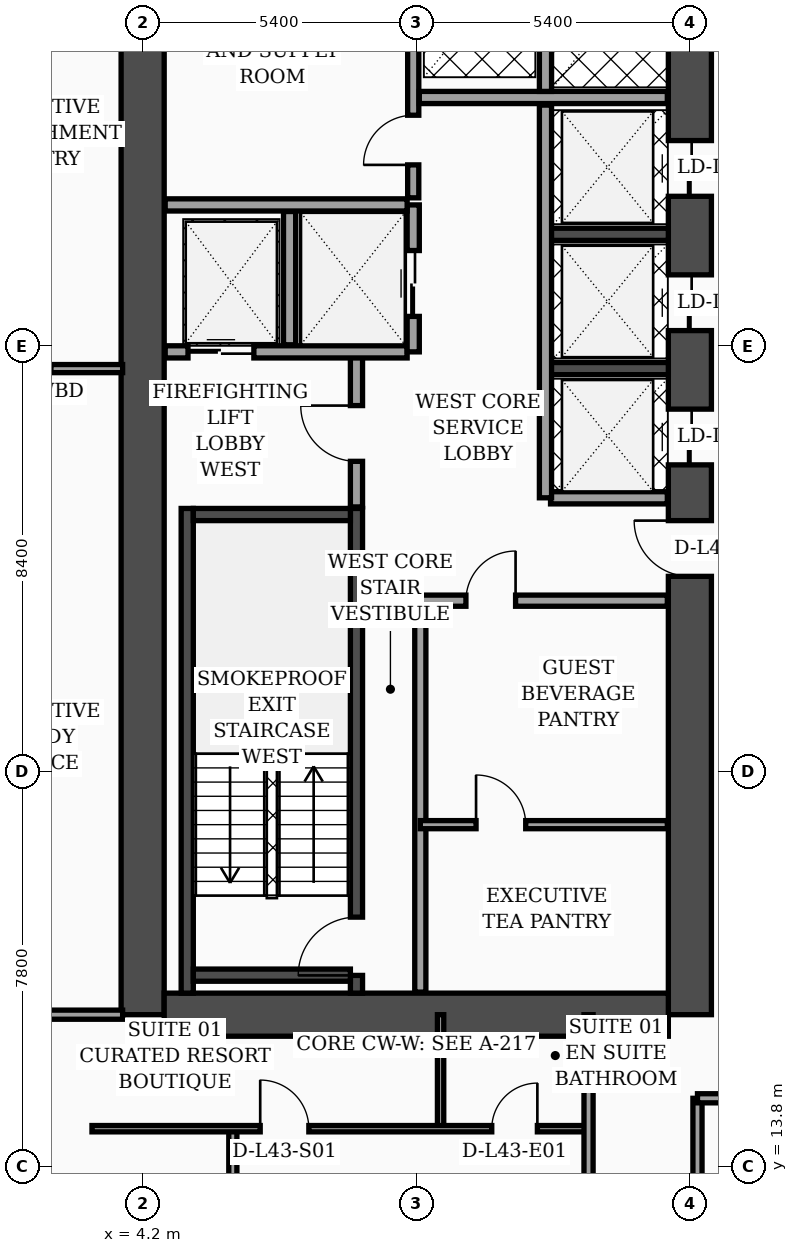
"""IFC4 building model, lengths in metres.
Left out: names, types, materials, properties, quantities, classifications, styles, units other than length and angle.
Written with IfcOpenShell. Run it as: python <this file> out.ifc"""

import sys

from ifc_helpers import new_model, si_unit, direction, frame, frame_2d, origin, place, context, subcontext, project, spatial, rectangle, extrude, element, fill, save


model = new_model("IFC4")
c1 = context("Model", 3, precision=1e-05, world=origin(), true_north=direction((0.0, 1.0)))
c2 = subcontext(c1, "Body", "Model", "MODEL_VIEW")
j1 = project(units=[si_unit("LENGTHUNIT", "METRE"), si_unit("PLANEANGLEUNIT", "RADIAN")], contexts=[c1])
p1 = place(None, origin())
s1 = spatial("IfcSite", under=j1, at=p1, CompositionType="ELEMENT")
p2 = place(p1, origin())
s2 = spatial("IfcBuilding", under=s1, at=p2, CompositionType="ELEMENT")
p3 = place(p2, frame((0.0, 0.0, 175.1)))
s3 = spatial("IfcBuildingStorey", under=s2, at=p3, CompositionType="ELEMENT", Elevation=175.1)
p4 = place(p3, frame((4.2, 16.8, 0.0), z_axis=(0.0, 0.0, 1.0), x_axis=(0.0, 1.0, 0.0)))
e1 = element("IfcWall", 1, at=p4, inside=s3, PredefinedType="SHEAR", context=c2, shape_type="SweptSolid", body=[
    extrude(rectangle(XDim=21.6, YDim=0.85, at=frame_2d((10.8, 0.0))), origin(), (0.0, 0.0, 1.0), 3.56),
])
p5 = place(p3, frame((15.0, 16.8, 0.0), z_axis=(0.0, 0.0, 1.0), x_axis=(0.0, 1.0, 0.0)))
e2 = element("IfcWall", 2, at=p5, inside=s3, PredefinedType="SHEAR", context=c2, shape_type="SweptSolid", body=[
    extrude(rectangle(XDim=21.6, YDim=0.85, at=frame_2d((10.8, 0.0))), origin(), (0.0, 0.0, 1.0), 3.56),
])
p6 = place(p5, frame((8.65, 0.0, 0.0)))
e3 = element("IfcOpeningElement", 3, at=p6, cuts=e2, PredefinedType="OPENING", context=c2, shape_type="SweptSolid", body=[
    extrude(rectangle(XDim=1.1, YDim=2.2, at=frame_2d((0.55, 1.1))), frame((0.0, 0.435, 0.0), z_axis=(0.0, -1.0, 0.0), x_axis=(1.0, 0.0, 0.0)), (0.0, 0.0, 1.0), 0.87),
])
p7 = place(p5, frame((10.85, 0.0, 0.0)))
e4 = element("IfcOpeningElement", 4, at=p7, cuts=e2, PredefinedType="OPENING", context=c2, shape_type="SweptSolid", body=[
    extrude(rectangle(XDim=1.1, YDim=2.2, at=frame_2d((0.55, 1.1))), frame((0.0, 0.435, 0.0), z_axis=(0.0, -1.0, 0.0), x_axis=(1.0, 0.0, 0.0)), (0.0, 0.0, 1.0), 0.87),
])
p8 = place(p5, frame((13.5, 0.0, 0.0)))
e5 = element("IfcOpeningElement", 5, at=p8, cuts=e2, PredefinedType="OPENING", context=c2, shape_type="SweptSolid", body=[
    extrude(rectangle(XDim=1.1, YDim=2.2, at=frame_2d((0.55, 1.1))), frame((0.0, 0.435, 0.0), z_axis=(0.0, -1.0, 0.0), x_axis=(1.0, 0.0, 0.0)), (0.0, 0.0, 1.0), 0.87),
])
p9 = place(p5, frame((16.15, 0.0, 0.0)))
e6 = element("IfcOpeningElement", 6, at=p9, cuts=e2, PredefinedType="OPENING", context=c2, shape_type="SweptSolid", body=[
    extrude(rectangle(XDim=1.1, YDim=2.2, at=frame_2d((0.55, 1.1))), frame((0.0, 0.435, 0.0), z_axis=(0.0, -1.0, 0.0), x_axis=(1.0, 0.0, 0.0)), (0.0, 0.0, 1.0), 0.87),
])
p10 = place(p3, frame((4.625, 16.8, 0.0), z_axis=(0.0, 0.0, 1.0), x_axis=(1.0, 0.0, 0.0)))
e7 = element("IfcWall", 7, at=p10, inside=s3, PredefinedType="SHEAR", context=c2, shape_type="SweptSolid", body=[
    extrude(rectangle(XDim=9.95, YDim=0.85, at=frame_2d((4.975, 0.0))), origin(), (0.0, 0.0, 1.0), 3.56),
])
p11 = place(p3, frame((5.08, 17.225, 0.0), z_axis=(0.0, 0.0, 1.0), x_axis=(0.0, 1.0, 0.0)))
e8 = element("IfcWall", 8, at=p11, inside=s3, PredefinedType="SOLIDWALL", context=c2, shape_type="SweptSolid", body=[
    extrude(rectangle(XDim=9.565, YDim=0.24, at=frame_2d((4.782, 0.0))), origin(), (0.0, 0.0, 1.0), 3.56),
])
p12 = place(p3, frame((8.42, 17.225, 0.0), z_axis=(0.0, 0.0, 1.0), x_axis=(0.0, 1.0, 0.0)))
e9 = element("IfcWall", 9, at=p12, inside=s3, PredefinedType="SOLIDWALL", context=c2, shape_type="SweptSolid", body=[
    extrude(rectangle(XDim=9.565, YDim=0.24, at=frame_2d((4.782, 0.0))), origin(), (0.0, 0.0, 1.0), 3.56),
])
p13 = place(p12, frame((0.35, 0.0, 0.0)))
e10 = element("IfcOpeningElement", 10, at=p13, cuts=e9, PredefinedType="OPENING", context=c2, shape_type="SweptSolid", body=[
    extrude(rectangle(XDim=1.15, YDim=2.2, at=frame_2d((0.575, 1.1))), frame((0.0, 0.13, 0.0), z_axis=(0.0, -1.0, 0.0), x_axis=(1.0, 0.0, 0.0)), (0.0, 0.0, 1.0), 0.26),
])
for number, where, z_axis, x_axis in (
    (11, (5.2, 17.58, 0.0), (0.0, 0.0, 1.0), (1.0, 0.0, 0.0)),
    (12, (5.2, 26.67, 0.0), (0.0, 0.0, 1.0), (1.0, 0.0, 0.0)),
):
    element("IfcWall", number, at=place(p3, frame(where, z_axis=z_axis, x_axis=x_axis)), inside=s3, PredefinedType="SOLIDWALL", context=c2, shape_type="SweptSolid", body=[
        extrude(rectangle(XDim=3.1, YDim=0.24, at=frame_2d((1.55, 0.0))), origin(), (0.0, 0.0, 1.0), 3.56),
    ])
for number, where, z_axis, x_axis in (
    (13, (12.18, 29.55, 0.0), (0.0, 0.0, 1.0), (1.0, 0.0, 0.0)),
    (14, (12.18, 32.2, 0.0), (0.0, 0.0, 1.0), (1.0, 0.0, 0.0)),
):
    element("IfcWall", number, at=place(p3, frame(where, z_axis=z_axis, x_axis=x_axis)), inside=s3, PredefinedType="SOLIDWALL", context=c2, shape_type="SweptSolid", body=[
        extrude(rectangle(XDim=2.395, YDim=0.24, at=frame_2d((1.198, 0.0))), origin(), (0.0, 0.0, 1.0), 3.56),
    ])
p14 = place(p3, frame((8.42, 26.82, 0.0), z_axis=(0.0, 0.0, 1.0), x_axis=(0.0, 1.0, 0.0)))
e15 = element("IfcWall", 15, at=p14, inside=s3, PredefinedType="SOLIDWALL", context=c2, shape_type="SweptSolid", body=[
    extrude(rectangle(XDim=3.0, YDim=0.24, at=frame_2d((1.5, 0.0))), origin(), (0.0, 0.0, 1.0), 3.56),
])
p15 = place(p14, frame((0.9, 0.0, 0.0)))
e16 = element("IfcOpeningElement", 16, at=p15, cuts=e15, PredefinedType="OPENING", context=c2, shape_type="SweptSolid", body=[
    extrude(rectangle(XDim=1.1, YDim=2.2, at=frame_2d((0.55, 1.1))), frame((0.0, 0.13, 0.0), z_axis=(0.0, -1.0, 0.0), x_axis=(1.0, 0.0, 0.0)), (0.0, 0.0, 1.0), 0.26),
])
p16 = place(p3, frame((4.645, 29.88, 0.0), z_axis=(0.0, 0.0, 1.0), x_axis=(1.0, 0.0, 0.0)))
e17 = element("IfcWall", 17, at=p16, inside=s3, PredefinedType="SOLIDWALL", context=c2, shape_type="SweptSolid", body=[
    extrude(rectangle(XDim=4.775, YDim=0.24, at=frame_2d((2.387, 0.0))), origin(), (0.0, 0.0, 1.0), 3.56),
])
p17 = place(p16, frame((0.45, 0.0, 0.0)))
e18 = element("IfcOpeningElement", 18, at=p17, cuts=e17, PredefinedType="OPENING", context=c2, shape_type="SweptSolid", body=[
    extrude(rectangle(XDim=1.3, YDim=2.35, at=frame_2d((0.65, 1.175))), frame((0.0, 0.13, 0.0), z_axis=(0.0, -1.0, 0.0), x_axis=(1.0, 0.0, 0.0)), (0.0, 0.0, 1.0), 0.26),
])
p18 = place(p3, frame((7.1, 30.02, 0.0), z_axis=(0.0, 0.0, 1.0), x_axis=(0.0, 1.0, 0.0)))
e19 = element("IfcWall", 19, at=p18, inside=s3, PredefinedType="SOLIDWALL", context=c2, shape_type="SweptSolid", body=[
    extrude(rectangle(XDim=2.63, YDim=0.24, at=frame_2d((1.315, 0.0))), origin(), (0.0, 0.0, 1.0), 3.56),
])
p19 = place(p3, frame((9.54, 29.88, 0.0), z_axis=(0.0, 0.0, 1.0), x_axis=(0.0, 1.0, 0.0)))
e20 = element("IfcWall", 20, at=p19, inside=s3, PredefinedType="SOLIDWALL", context=c2, shape_type="SweptSolid", body=[
    extrude(rectangle(XDim=2.9, YDim=0.24, at=frame_2d((1.45, 0.0))), origin(), (0.0, 0.0, 1.0), 3.56),
])
p20 = place(p19, frame((0.7, 0.0, 0.0)))
e21 = element("IfcOpeningElement", 21, at=p20, cuts=e20, PredefinedType="OPENING", context=c2, shape_type="SweptSolid", body=[
    extrude(rectangle(XDim=1.3, YDim=2.35, at=frame_2d((0.65, 1.175))), frame((0.0, 0.13, 0.0), z_axis=(0.0, -1.0, 0.0), x_axis=(1.0, 0.0, 0.0)), (0.0, 0.0, 1.0), 0.26),
])
p21 = place(p3, frame((4.645, 32.78, 0.0), z_axis=(0.0, 0.0, 1.0), x_axis=(1.0, 0.0, 0.0)))
e22 = element("IfcWall", 22, at=p21, inside=s3, PredefinedType="SOLIDWALL", context=c2, shape_type="SweptSolid", body=[
    extrude(rectangle(XDim=4.775, YDim=0.24, at=frame_2d((2.387, 0.0))), origin(), (0.0, 0.0, 1.0), 3.19),
])
p22 = place(p3, frame((9.68, 17.245, 0.0), z_axis=(0.0, 0.0, 1.0), x_axis=(0.0, 1.0, 0.0)))
e23 = element("IfcWall", 23, at=p22, inside=s3, PredefinedType="SOLIDWALL", context=c2, shape_type="SweptSolid", body=[
    extrude(rectangle(XDim=7.755, YDim=0.22, at=frame_2d((3.877, 0.0))), origin(), (0.0, 0.0, 1.0), 3.56),
])
p23 = place(p3, frame((9.54, 32.92, 0.0), z_axis=(0.0, 0.0, 1.0), x_axis=(0.0, 1.0, 0.0)))
e24 = element("IfcWall", 24, at=p23, inside=s3, PredefinedType="SOLIDWALL", context=c2, shape_type="SweptSolid", body=[
    extrude(rectangle(XDim=5.035, YDim=0.22, at=frame_2d((2.518, 0.0))), origin(), (0.0, 0.0, 1.0), 3.56),
])
p24 = place(p23, frame((0.65, 0.0, 0.0)))
e25 = element("IfcOpeningElement", 25, at=p24, cuts=e24, PredefinedType="OPENING", context=c2, shape_type="SweptSolid", body=[
    extrude(rectangle(XDim=0.98, YDim=2.15, at=frame_2d((0.49, 1.075))), frame((0.0, 0.12, 0.0), z_axis=(0.0, -1.0, 0.0), x_axis=(1.0, 0.0, 0.0)), (0.0, 0.0, 1.0), 0.24),
])
p25 = place(p3, frame((9.68, 20.55, 0.0), z_axis=(0.0, 0.0, 1.0), x_axis=(1.0, 0.0, 0.0)))
e26 = element("IfcWall", 26, at=p25, inside=s3, PredefinedType="PARTITIONING", context=c2, shape_type="SweptSolid", body=[
    extrude(rectangle(XDim=4.875, YDim=0.16, at=frame_2d((2.438, 0.0))), origin(), (0.0, 0.0, 1.0), 3.56),
])
p26 = place(p25, frame((1.1, 0.0, 0.0)))
e27 = element("IfcOpeningElement", 27, at=p26, cuts=e26, PredefinedType="OPENING", context=c2, shape_type="SweptSolid", body=[
    extrude(rectangle(XDim=0.98, YDim=2.15, at=frame_2d((0.49, 1.075))), frame((0.0, 0.09, 0.0), z_axis=(0.0, -1.0, 0.0), x_axis=(1.0, 0.0, 0.0)), (0.0, 0.0, 1.0), 0.18),
])
p27 = place(p3, frame((9.68, 24.97, 0.0), z_axis=(0.0, 0.0, 1.0), x_axis=(1.0, 0.0, 0.0)))
e28 = element("IfcWall", 28, at=p27, inside=s3, PredefinedType="SOLIDWALL", context=c2, shape_type="SweptSolid", body=[
    extrude(rectangle(XDim=4.875, YDim=0.22, at=frame_2d((2.438, 0.0))), origin(), (0.0, 0.0, 1.0), 2.94),
])
p28 = place(p27, frame((0.9, 0.0, 0.0)))
e29 = element("IfcOpeningElement", 29, at=p28, cuts=e28, PredefinedType="OPENING", context=c2, shape_type="SweptSolid", body=[
    extrude(rectangle(XDim=0.98, YDim=2.15, at=frame_2d((0.49, 1.075))), frame((0.0, 0.12, 0.0), z_axis=(0.0, -1.0, 0.0), x_axis=(1.0, 0.0, 0.0)), (0.0, 0.0, 1.0), 0.24),
])
p29 = place(p3, frame((12.25, 27.0, 0.0), z_axis=(0.0, 0.0, 1.0), x_axis=(1.0, 0.0, 0.0)))
e30 = element("IfcWall", 30, at=p29, inside=s3, PredefinedType="SOLIDWALL", context=c2, shape_type="SweptSolid", body=[
    extrude(rectangle(XDim=2.305, YDim=0.24, at=frame_2d((1.152, 0.0))), origin(), (0.0, 0.0, 1.0), 3.56),
])
p30 = place(p3, frame((12.15, 27.0, 0.0), z_axis=(0.0, 0.0, 1.0), x_axis=(0.0, 1.0, 0.0)))
e31 = element("IfcWall", 31, at=p30, inside=s3, PredefinedType="SOLIDWALL", context=c2, shape_type="SweptSolid", body=[
    extrude(rectangle(XDim=7.75, YDim=0.24, at=frame_2d((3.875, 0.0))), origin(), (0.0, 0.0, 1.0), 3.56),
])
p31 = place(p3, frame((9.66, 34.9, 0.0), z_axis=(0.0, 0.0, 1.0), x_axis=(1.0, 0.0, 0.0)))
e32 = element("IfcWall", 32, at=p31, inside=s3, PredefinedType="SOLIDWALL", context=c2, shape_type="SweptSolid", body=[
    extrude(rectangle(XDim=4.895, YDim=0.24, at=frame_2d((2.448, 0.0))), origin(), (0.0, 0.0, 1.0), 3.56),
])
p32 = place(p3, frame((12.15, 35.02, 0.0), z_axis=(0.0, 0.0, 1.0), x_axis=(0.0, 1.0, 0.0)))
e33 = element("IfcWall", 33, at=p32, inside=s3, PredefinedType="SOLIDWALL", context=c2, shape_type="SweptSolid", body=[
    extrude(rectangle(XDim=2.935, YDim=0.24, at=frame_2d((1.468, 0.0))), origin(), (0.0, 0.0, 1.0), 3.56),
])
p33 = place(p3, frame((0.08, 29.55, 0.0), z_axis=(0.0, 0.0, 1.0), x_axis=(1.0, 0.0, 0.0)))
e34 = element("IfcWall", 34, at=p33, inside=s3, PredefinedType="PARTITIONING", context=c2, shape_type="SweptSolid", body=[
    extrude(rectangle(XDim=3.725, YDim=0.16, at=frame_2d((1.862, 0.0))), origin(), (0.0, 0.0, 1.0), 3.04),
])
p34 = place(p33, frame((1.35, 0.0, 0.0)))
e35 = element("IfcOpeningElement", 35, at=p34, cuts=e34, PredefinedType="OPENING", context=c2, shape_type="SweptSolid", body=[
    extrude(rectangle(XDim=0.96, YDim=2.2, at=frame_2d((0.48, 1.1))), frame((0.0, 0.09, 0.0), z_axis=(0.0, -1.0, 0.0), x_axis=(1.0, 0.0, 0.0)), (0.0, 0.0, 1.0), 0.18),
])
p35 = place(p3, frame((0.08, 16.8, 0.0), z_axis=(0.0, 0.0, 1.0), x_axis=(1.0, 0.0, 0.0)))
e36 = element("IfcWall", 36, at=p35, inside=s3, PredefinedType="PARTITIONING", context=c2, shape_type="SweptSolid", body=[
    extrude(rectangle(XDim=3.725, YDim=0.18, at=frame_2d((1.862, 0.0))), origin(), (0.0, 0.0, 1.0), 2.94),
])
p36 = place(p3, frame((10.08, 14.55, 0.0), z_axis=(0.0, 0.0, 1.0), x_axis=(0.0, 1.0, 0.0)))
e37 = element("IfcWall", 37, at=p36, inside=s3, PredefinedType="PARTITIONING", context=c2, shape_type="SweptSolid", body=[
    extrude(rectangle(XDim=2.25, YDim=0.125, at=frame_2d((1.125, 0.0))), origin(), (0.0, 0.0, 1.0), 3.56),
])
p37 = place(p3, frame((5.98, 2.44, 0.0), z_axis=(0.0, 0.0, 1.0), x_axis=(0.0, 1.0, 0.0)))
e38 = element("IfcWall", 38, at=p37, inside=s3, PredefinedType="PARTITIONING", context=c2, shape_type="SweptSolid", body=[
    extrude(rectangle(XDim=12.11, YDim=0.16, at=frame_2d((6.055, 0.0))), origin(), (0.0, 0.0, 1.0), 3.04),
])
p38 = place(p37, frame((5.58, 0.0, 0.0)))
e39 = element("IfcOpeningElement", 39, at=p38, cuts=e38, PredefinedType="OPENING", context=c2, shape_type="SweptSolid", body=[
    extrude(rectangle(XDim=0.96, YDim=2.2, at=frame_2d((0.48, 1.1))), frame((0.0, 0.09, 0.0), z_axis=(0.0, -1.0, 0.0), x_axis=(1.0, 0.0, 0.0)), (0.0, 0.0, 1.0), 0.18),
])
p39 = place(p3, frame((3.2, 14.55, 0.0), z_axis=(0.0, 0.0, 1.0), x_axis=(1.0, 0.0, 0.0)))
e40 = element("IfcWall", 40, at=p39, inside=s3, PredefinedType="PARTITIONING", context=c2, shape_type="SweptSolid", body=[
    extrude(rectangle(XDim=9.8, YDim=0.125, at=frame_2d((4.9, 0.0))), origin(), (0.0, 0.0, 1.0), 2.94),
])
p40 = place(p39, frame((3.32, 0.0, 0.0)))
e41 = element("IfcOpeningElement", 41, at=p40, cuts=e40, PredefinedType="OPENING", context=c2, shape_type="SweptSolid", body=[
    extrude(rectangle(XDim=0.96, YDim=2.2, at=frame_2d((0.48, 1.1))), frame((0.0, 0.073, 0.0), z_axis=(0.0, -1.0, 0.0), x_axis=(1.0, 0.0, 0.0)), (0.0, 0.0, 1.0), 0.145),
])
p41 = place(p39, frame((7.89, 0.0, 0.0)))
e42 = element("IfcOpeningElement", 42, at=p41, cuts=e40, PredefinedType="OPENING", context=c2, shape_type="SweptSolid", body=[
    extrude(rectangle(XDim=0.9, YDim=2.15, at=frame_2d((0.45, 1.075))), frame((0.0, 0.073, 0.0), z_axis=(0.0, -1.0, 0.0), x_axis=(1.0, 0.0, 0.0)), (0.0, 0.0, 1.0), 0.145),
])
p42 = place(p3, frame((13.0, 2.44, 0.0), z_axis=(0.0, 0.0, 1.0), x_axis=(0.0, 1.0, 0.0)))
e43 = element("IfcWall", 43, at=p42, inside=s3, PredefinedType="PARTITIONING", context=c2, shape_type="SweptSolid", body=[
    extrude(rectangle(XDim=14.36, YDim=0.18, at=frame_2d((7.18, 0.0))), origin(), (0.0, 0.0, 1.0), 2.94),
])
p43 = place(p42, frame((3.01, 0.0, 0.0)))
e44 = element("IfcOpeningElement", 44, at=p43, cuts=e43, PredefinedType="OPENING", context=c2, shape_type="SweptSolid", body=[
    extrude(rectangle(XDim=1.02, YDim=2.2, at=frame_2d((0.51, 1.1))), frame((0.0, 0.1, 0.0), z_axis=(0.0, -1.0, 0.0), x_axis=(1.0, 0.0, 0.0)), (0.0, 0.0, 1.0), 0.2),
])
p44 = place(p3, frame((15.15, 2.44, 0.0), z_axis=(0.0, 0.0, 1.0), x_axis=(0.0, 1.0, 0.0)))
e45 = element("IfcWall", 45, at=p44, inside=s3, PredefinedType="PARTITIONING", context=c2, shape_type="SweptSolid", body=[
    extrude(rectangle(XDim=12.71, YDim=0.18, at=frame_2d((6.355, 0.0))), origin(), (0.0, 0.0, 1.0), 3.04),
])
p45 = place(p3, frame((15.15, 15.15, 0.0), z_axis=(0.0, 0.0, 1.0), x_axis=(1.0, 0.0, 0.0)))
e46 = element("IfcWall", 46, at=p45, inside=s3, PredefinedType="PARTITIONING", context=c2, shape_type="SweptSolid", body=[
    extrude(rectangle(XDim=6.45, YDim=0.18, at=frame_2d((3.225, 0.0))), origin(), (0.0, 0.0, 1.0), 2.49),
])
p46 = place(p45, frame((1.74, 0.0, 0.0)))
e47 = element("IfcOpeningElement", 47, at=p46, cuts=e46, PredefinedType="OPENING", context=c2, shape_type="SweptSolid", body=[
    extrude(rectangle(XDim=1.02, YDim=2.2, at=frame_2d((0.51, 1.1))), frame((0.0, 0.1, 0.0), z_axis=(0.0, -1.0, 0.0), x_axis=(1.0, 0.0, 0.0)), (0.0, 0.0, 1.0), 0.2),
])
p47 = place(p15, origin())
e48 = element("IfcDoor", 48, at=p47, inside=s3, OperationType="SINGLE_SWING_RIGHT", PredefinedType="DOOR", context=c2, shape_type="SweptSolid", body=[
    extrude(rectangle(XDim=1.1, YDim=2.2, at=frame_2d((0.55, 1.1))), frame((0.0, 0.025, 0.0), z_axis=(0.0, -1.0, 0.0), x_axis=(1.0, 0.0, 0.0)), (0.0, 0.0, 1.0), 0.05),
])
fill(e16, e48)
p48 = place(p17, origin())
e49 = element("IfcDoor", 49, at=p48, inside=s3, OperationType="DOUBLE_DOOR_SLIDING", PredefinedType="DOOR", context=c2, shape_type="SweptSolid", body=[
    extrude(rectangle(XDim=1.3, YDim=2.35, at=frame_2d((0.65, 1.175))), frame((0.0, 0.025, 0.0), z_axis=(0.0, -1.0, 0.0), x_axis=(1.0, 0.0, 0.0)), (0.0, 0.0, 1.0), 0.05),
])
fill(e18, e49)
p49 = place(p20, origin())
e50 = element("IfcDoor", 50, at=p49, inside=s3, OperationType="DOUBLE_DOOR_SLIDING", PredefinedType="DOOR", context=c2, shape_type="SweptSolid", body=[
    extrude(rectangle(XDim=1.3, YDim=2.35, at=frame_2d((0.65, 1.175))), frame((0.0, 0.025, 0.0), z_axis=(0.0, -1.0, 0.0), x_axis=(1.0, 0.0, 0.0)), (0.0, 0.0, 1.0), 0.05),
])
fill(e21, e50)
p50 = place(p24, origin())
e51 = element("IfcDoor", 51, at=p50, inside=s3, OperationType="SINGLE_SWING_LEFT", PredefinedType="DOOR", context=c2, shape_type="SweptSolid", body=[
    extrude(rectangle(XDim=0.98, YDim=2.15, at=frame_2d((0.49, 1.075))), frame((0.0, 0.025, 0.0), z_axis=(0.0, -1.0, 0.0), x_axis=(1.0, 0.0, 0.0)), (0.0, 0.0, 1.0), 0.05),
])
fill(e25, e51)
p51 = place(p26, origin())
e52 = element("IfcDoor", 52, at=p51, inside=s3, OperationType="SINGLE_SWING_LEFT", PredefinedType="DOOR", context=c2, shape_type="SweptSolid", body=[
    extrude(rectangle(XDim=0.98, YDim=2.15, at=frame_2d((0.49, 1.075))), frame((0.0, 0.025, 0.0), z_axis=(0.0, -1.0, 0.0), x_axis=(1.0, 0.0, 0.0)), (0.0, 0.0, 1.0), 0.05),
])
fill(e27, e52)
p52 = place(p28, origin())
e53 = element("IfcDoor", 53, at=p52, inside=s3, OperationType="SINGLE_SWING_RIGHT", PredefinedType="DOOR", context=c2, shape_type="SweptSolid", body=[
    extrude(rectangle(XDim=0.98, YDim=2.15, at=frame_2d((0.49, 1.075))), frame((0.0, 0.025, 0.0), z_axis=(0.0, -1.0, 0.0), x_axis=(1.0, 0.0, 0.0)), (0.0, 0.0, 1.0), 0.05),
])
fill(e29, e53)
p53 = place(p40, origin())
e54 = element("IfcDoor", 54, at=p53, inside=s3, OperationType="SINGLE_SWING_LEFT", PredefinedType="DOOR", context=c2, shape_type="SweptSolid", body=[
    extrude(rectangle(XDim=0.96, YDim=2.2, at=frame_2d((0.48, 1.1))), frame((0.0, 0.025, 0.0), z_axis=(0.0, -1.0, 0.0), x_axis=(1.0, 0.0, 0.0)), (0.0, 0.0, 1.0), 0.05),
])
fill(e41, e54)
p54 = place(p41, origin())
e55 = element("IfcDoor", 55, at=p54, inside=s3, OperationType="SINGLE_SWING_RIGHT", PredefinedType="DOOR", context=c2, shape_type="SweptSolid", body=[
    extrude(rectangle(XDim=0.9, YDim=2.15, at=frame_2d((0.45, 1.075))), frame((0.0, 0.025, 0.0), z_axis=(0.0, -1.0, 0.0), x_axis=(1.0, 0.0, 0.0)), (0.0, 0.0, 1.0), 0.05),
])
fill(e42, e55)
p55 = place(p13, origin())
e56 = element("IfcDoor", 56, at=p55, inside=s3, OperationType="SINGLE_SWING_LEFT", PredefinedType="DOOR", context=c2, shape_type="SweptSolid", body=[
    extrude(rectangle(XDim=1.15, YDim=2.2, at=frame_2d((0.575, 1.1))), frame((0.0, 0.025, 0.0), z_axis=(0.0, -1.0, 0.0), x_axis=(1.0, 0.0, 0.0)), (0.0, 0.0, 1.0), 0.05),
])
fill(e10, e56)
p56 = place(p6, origin())
e57 = element("IfcDoor", 57, at=p56, inside=s3, OperationType="SINGLE_SWING_RIGHT", PredefinedType="DOOR", context=c2, shape_type="SweptSolid", body=[
    extrude(rectangle(XDim=1.1, YDim=2.2, at=frame_2d((0.55, 1.1))), frame((0.0, 0.025, 0.0), z_axis=(0.0, -1.0, 0.0), x_axis=(1.0, 0.0, 0.0)), (0.0, 0.0, 1.0), 0.05),
])
fill(e3, e57)
p57 = place(p7, origin())
e58 = element("IfcDoor", 58, at=p57, inside=s3, OperationType="DOUBLE_DOOR_SLIDING", PredefinedType="DOOR", context=c2, shape_type="SweptSolid", body=[
    extrude(rectangle(XDim=1.1, YDim=2.2, at=frame_2d((0.55, 1.1))), frame((0.0, 0.025, 0.0), z_axis=(0.0, -1.0, 0.0), x_axis=(1.0, 0.0, 0.0)), (0.0, 0.0, 1.0), 0.05),
])
fill(e4, e58)
p58 = place(p8, origin())
e59 = element("IfcDoor", 59, at=p58, inside=s3, OperationType="DOUBLE_DOOR_SLIDING", PredefinedType="DOOR", context=c2, shape_type="SweptSolid", body=[
    extrude(rectangle(XDim=1.1, YDim=2.2, at=frame_2d((0.55, 1.1))), frame((0.0, 0.025, 0.0), z_axis=(0.0, -1.0, 0.0), x_axis=(1.0, 0.0, 0.0)), (0.0, 0.0, 1.0), 0.05),
])
fill(e5, e59)
p59 = place(p9, origin())
e60 = element("IfcDoor", 60, at=p59, inside=s3, OperationType="DOUBLE_DOOR_SLIDING", PredefinedType="DOOR", context=c2, shape_type="SweptSolid", body=[
    extrude(rectangle(XDim=1.1, YDim=2.2, at=frame_2d((0.55, 1.1))), frame((0.0, 0.025, 0.0), z_axis=(0.0, -1.0, 0.0), x_axis=(1.0, 0.0, 0.0)), (0.0, 0.0, 1.0), 0.05),
])
fill(e6, e60)
save(model, sys.argv[1])
